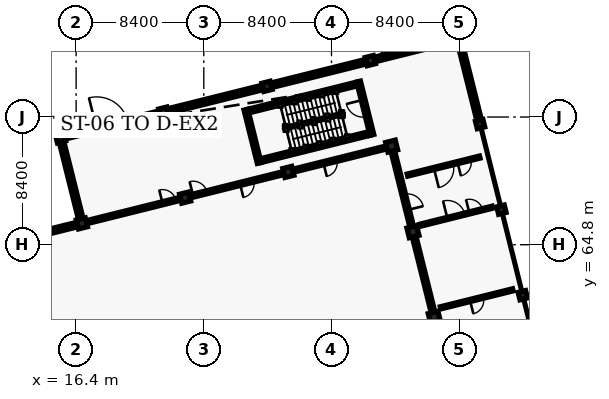
"""IFC4 building model, lengths in metres.
Left out: names, types, materials, properties, quantities, classifications, styles, units other than length and angle.
Written with IfcOpenShell. Run it as: python <this file> out.ifc"""

import sys

from ifc_helpers import new_model, si_unit, direction, frame, frame_2d, origin, origin_2d, place, context, subcontext, project, spatial, rectangle, extrude, element, fill, save


model = new_model("IFC4")
c1 = context("Model", 3, precision=1e-05, world=origin(), true_north=direction((0.0, 1.0)))
c2 = subcontext(c1, "Body", "Model", "MODEL_VIEW")
j1 = project(units=[si_unit("LENGTHUNIT", "METRE"), si_unit("PLANEANGLEUNIT", "RADIAN")], contexts=[c1])
p1 = place(None, origin())
s1 = spatial("IfcSite", under=j1, at=p1, CompositionType="ELEMENT")
p2 = place(p1, origin())
s2 = spatial("IfcBuilding", under=s1, at=p2, CompositionType="ELEMENT")
p3 = place(p2, origin())
s3 = spatial("IfcBuildingStorey", under=s2, at=p3, CompositionType="ELEMENT", Elevation=0.0)
for number, where, z_axis, x_axis in (
    (1, (39.962, 60.029, 0.0), (0.0, 0.0, 1.0), (0.97, 0.242, 0.0)),
    (2, (38.559, 65.657, 0.0), (0.0, 0.0, 1.0), (0.97, 0.242, 0.0)),
    (3, (37.156, 71.285, 0.0), (0.0, 0.0, 1.0), (0.97, 0.242, 0.0)),
):
    element("IfcColumn", number, at=place(p3, frame(where, z_axis=z_axis, x_axis=x_axis)), inside=s3, PredefinedType="COLUMN", context=c2, shape_type="SweptSolid", body=[
        extrude(rectangle(XDim=0.65, YDim=0.65, at=origin_2d()), origin(), (0.0, 0.0, 1.0), 4.8),
    ])
for number, where, z_axis, x_axis in (
    (4, (45.784, 61.481, 0.0), (0.0, 0.0, 1.0), (0.97, 0.242, 0.0)),
    (5, (44.381, 67.108, 0.0), (0.0, 0.0, 1.0), (0.97, 0.242, 0.0)),
    (6, (42.977, 72.736, 0.0), (0.0, 0.0, 1.0), (0.97, 0.242, 0.0)),
):
    element("IfcColumn", number, at=place(p3, frame(where, z_axis=z_axis, x_axis=x_axis)), inside=s3, PredefinedType="COLUMN", context=c2, shape_type="SweptSolid", body=[
        extrude(rectangle(XDim=0.5, YDim=0.5, at=origin_2d()), origin(), (0.0, 0.0, 1.0), 4.8),
    ])
for number, where, z_axis, x_axis in (
    (7, (16.779, 66.204, 0.0), (0.0, 0.0, 1.0), (0.97, 0.242, 0.0)),
    (8, (23.572, 67.898, 0.0), (0.0, 0.0, 1.0), (0.97, 0.242, 0.0)),
    (9, (30.364, 69.591, 0.0), (0.0, 0.0, 1.0), (0.97, 0.242, 0.0)),
):
    element("IfcColumn", number, at=place(p3, frame(where, z_axis=z_axis, x_axis=x_axis)), inside=s3, PredefinedType="COLUMN", context=c2, shape_type="SweptSolid", body=[
        extrude(rectangle(XDim=0.6, YDim=0.6, at=origin_2d()), origin(), (0.0, 0.0, 1.0), 4.8),
    ])
for number, where, z_axis, x_axis in (
    (10, (15.376, 71.832, 0.0), (0.0, 0.0, 1.0), (0.97, 0.242, 0.0)),
    (11, (22.168, 73.525, 0.0), (0.0, 0.0, 1.0), (0.97, 0.242, 0.0)),
    (12, (28.96, 75.219, 0.0), (0.0, 0.0, 1.0), (0.97, 0.242, 0.0)),
    (13, (35.753, 76.912, 0.0), (0.0, 0.0, 1.0), (0.97, 0.242, 0.0)),
):
    element("IfcColumn", number, at=place(p3, frame(where, z_axis=z_axis, x_axis=x_axis)), inside=s3, PredefinedType="COLUMN", context=c2, shape_type="SweptSolid", body=[
        extrude(rectangle(XDim=0.55, YDim=0.55, at=origin_2d()), origin(), (0.0, 0.0, 1.0), 4.8),
    ])
p4 = place(p3, frame((10.065, 64.53, 0.0), z_axis=(0.0, 0.0, 1.0), x_axis=(0.97027883487, 0.241989633258, 0.0)))
e14 = element("IfcWall", 14, at=p4, inside=s3, PredefinedType="SOLIDWALL", context=c2, shape_type="SweptSolid", body=[
    extrude(rectangle(XDim=6.839, YDim=0.3, at=frame_2d((3.42, 0.0))), origin(), (0.0, 0.0, 1.0), 4.085),
])
for number, where, z_axis, x_axis in (
    (15, (16.76, 66.282, 0.0), (0.0, 0.0, 1.0), (-0.242, 0.97, 0.0)),
    (16, (42.958, 72.814, 0.0), (0.0, 0.0, 1.0), (-0.242, 0.97, 0.0)),
):
    element("IfcWall", number, at=place(p3, frame(where, z_axis=z_axis, x_axis=x_axis)), inside=s3, PredefinedType="SOLIDWALL", context=c2, shape_type="SweptSolid", body=[
        extrude(rectangle(XDim=5.64, YDim=0.3, at=frame_2d((2.82, 0.0))), origin(), (0.0, 0.0, 1.0), 4.095),
    ])
p5 = place(p3, frame((15.473, 71.856, 0.0), z_axis=(0.0, 0.0, 1.0), x_axis=(0.970298579828, 0.24191045034, 0.0)))
e17 = element("IfcWall", 17, at=p5, inside=s3, PredefinedType="SOLIDWALL", context=c2, shape_type="SweptSolid", body=[
    extrude(rectangle(XDim=6.8, YDim=0.3, at=frame_2d((3.4, 0.0))), origin(), (0.0, 0.0, 1.0), 4.065),
])
p6 = place(p5, frame((2.35, 0.0, 0.0)))
e18 = element("IfcOpeningElement", 18, at=p6, cuts=e17, PredefinedType="OPENING", context=c2, shape_type="SweptSolid", body=[
    extrude(rectangle(XDim=2.1, YDim=2.35, at=frame_2d((1.05, 1.175))), frame((0.0, 0.16, 0.0), z_axis=(0.0, -1.0, 0.0), x_axis=(1.0, 0.0, 0.0)), (0.0, 0.0, 1.0), 0.32),
])
p7 = place(p3, frame((22.265, 73.55, 0.0), z_axis=(0.0, 0.0, 1.0), x_axis=(0.970298579828, 0.24191045034, 0.0)))
e19 = element("IfcWall", 19, at=p7, inside=s3, PredefinedType="SOLIDWALL", context=c2, shape_type="SweptSolid", body=[
    extrude(rectangle(XDim=6.8, YDim=0.3, at=frame_2d((3.4, 0.0))), origin(), (0.0, 0.0, 1.0), 4.065),
])
p8 = place(p3, frame((29.058, 75.243, 0.0), z_axis=(0.0, 0.0, 1.0), x_axis=(0.970296478685, 0.241918877831, 0.0)))
e20 = element("IfcWall", 20, at=p8, inside=s3, PredefinedType="SOLIDWALL", context=c2, shape_type="SweptSolid", body=[
    extrude(rectangle(XDim=6.8, YDim=0.3, at=frame_2d((3.4, 0.0))), origin(), (0.0, 0.0, 1.0), 4.065),
])
p9 = place(p3, frame((35.85, 76.937, 0.0), z_axis=(0.0, 0.0, 1.0), x_axis=(0.97029090175, 0.241941244896, 0.0)))
e21 = element("IfcWall", 21, at=p9, inside=s3, PredefinedType="SOLIDWALL", context=c2, shape_type="SweptSolid", body=[
    extrude(rectangle(XDim=5.799, YDim=0.3, at=frame_2d((2.9, 0.0))), origin(), (0.0, 0.0, 1.0), 4.065),
])
p10 = place(p9, frame((0.775, 0.0, 0.0)))
e22 = element("IfcOpeningElement", 22, at=p10, cuts=e21, PredefinedType="OPENING", context=c2, shape_type="SweptSolid", body=[
    extrude(rectangle(XDim=2.05, YDim=2.32, at=frame_2d((1.025, 1.16))), frame((0.0, 0.16, 0.0), z_axis=(0.0, -1.0, 0.0), x_axis=(1.0, 0.0, 0.0)), (0.0, 0.0, 1.0), 0.32),
])
p11 = place(p3, frame((34.984, 75.531, 0.0), z_axis=(0.0, 0.0, 1.0), x_axis=(0.242090083699, -0.97025377679, 0.0)))
e23 = element("IfcWall", 23, at=p11, inside=s3, PredefinedType="SHEAR", context=c2, shape_type="SweptSolid", body=[
    extrude(rectangle(XDim=3.61, YDim=0.25, at=frame_2d((1.805, 0.0))), origin(), (0.0, 0.0, 1.0), 4.56),
])
p12 = place(p11, frame((1.235, 0.0, 0.0)))
e24 = element("IfcOpeningElement", 24, at=p12, cuts=e23, PredefinedType="OPENING", context=c2, shape_type="SweptSolid", body=[
    extrude(rectangle(XDim=1.14, YDim=2.15, at=frame_2d((0.57, 1.075))), frame((0.0, 0.135, 0.0), z_axis=(0.0, -1.0, 0.0), x_axis=(1.0, 0.0, 0.0)), (0.0, 0.0, 1.0), 0.27),
])
p13 = place(p3, frame((28.444, 70.18, 0.0), z_axis=(0.0, 0.0, 1.0), x_axis=(-0.241898912952, 0.970301456204, 0.0)))
e25 = element("IfcWall", 25, at=p13, inside=s3, PredefinedType="SHEAR", context=c2, shape_type="SweptSolid", body=[
    extrude(rectangle(XDim=3.609, YDim=0.25, at=frame_2d((1.805, 0.0))), origin(), (0.0, 0.0, 1.0), 4.56),
])
p14 = place(p3, frame((35.706, 72.119, 0.0), z_axis=(0.0, 0.0, 1.0), x_axis=(-0.970299691856, -0.241905989972, 0.0)))
e26 = element("IfcWall", 26, at=p14, inside=s3, PredefinedType="SHEAR", context=c2, shape_type="SweptSolid", body=[
    extrude(rectangle(XDim=7.391, YDim=0.25, at=frame_2d((3.695, 0.0))), origin(), (0.0, 0.0, 1.0), 4.56),
])
p15 = place(p3, frame((27.723, 73.591, 0.0), z_axis=(0.0, 0.0, 1.0), x_axis=(0.970291958031, 0.241937008705, 0.0)))
e27 = element("IfcWall", 27, at=p15, inside=s3, PredefinedType="SHEAR", context=c2, shape_type="SweptSolid", body=[
    extrude(rectangle(XDim=7.39, YDim=0.25, at=frame_2d((3.695, 0.0))), origin(), (0.0, 0.0, 1.0), 4.56),
])
p16 = place(p3, frame((41.28, 54.742, 0.0), z_axis=(0.0, 0.0, 1.0), x_axis=(-0.241866165603, 0.970309619625, 0.0)))
e28 = element("IfcWall", 28, at=p16, inside=s3, PredefinedType="PARTITIONING", context=c2, shape_type="SweptSolid", body=[
    extrude(rectangle(XDim=10.898, YDim=0.24, at=frame_2d((5.449, 0.0))), origin(), (0.0, 0.0, 1.0), 4.006),
])
p17 = place(p16, frame((3.539, 0.0, 0.0)))
e29 = element("IfcOpeningElement", 29, at=p17, cuts=e28, PredefinedType="OPENING", context=c2, shape_type="SweptSolid", body=[
    extrude(rectangle(XDim=1.12, YDim=2.16, at=frame_2d((0.56, 1.08))), frame((0.0, 0.13, 0.0), z_axis=(0.0, -1.0, 0.0), x_axis=(1.0, 0.0, 0.0)), (0.0, 0.0, 1.0), 0.26),
])
p18 = place(p3, frame((38.474, 65.997, 0.0), z_axis=(0.0, 0.0, 1.0), x_axis=(-0.241825856576, 0.970319666446, 0.0)))
e30 = element("IfcWall", 30, at=p18, inside=s3, PredefinedType="PARTITIONING", context=c2, shape_type="SweptSolid", body=[
    extrude(rectangle(XDim=5.099, YDim=0.24, at=frame_2d((2.55, 0.0))), origin(), (0.0, 0.0, 1.0), 3.845),
])
p19 = place(p18, frame((1.12, 0.0, 0.0)))
e31 = element("IfcOpeningElement", 31, at=p19, cuts=e30, PredefinedType="OPENING", context=c2, shape_type="SweptSolid", body=[
    extrude(rectangle(XDim=1.06, YDim=2.16, at=frame_2d((0.53, 1.08))), frame((0.0, 0.13, 0.0), z_axis=(0.0, -1.0, 0.0), x_axis=(1.0, 0.0, 0.0)), (0.0, 0.0, 1.0), 0.26),
])
p20 = place(p3, frame((17.119, 66.289, 0.0), z_axis=(0.0, 0.0, 1.0), x_axis=(0.970297233618, 0.241915849902, 0.0)))
e32 = element("IfcWall", 32, at=p20, inside=s3, PredefinedType="PARTITIONING", context=c2, shape_type="SweptSolid", body=[
    extrude(rectangle(XDim=20.3, YDim=0.2, at=frame_2d((10.15, 0.0))), origin(), (0.0, 0.0, 1.0), 3.845),
])
p21 = place(p20, frame((7.192, 0.0, 0.0)))
e33 = element("IfcOpeningElement", 33, at=p21, cuts=e32, PredefinedType="OPENING", context=c2, shape_type="SweptSolid", body=[
    extrude(rectangle(XDim=0.95, YDim=2.12, at=frame_2d((0.475, 1.06))), frame((0.0, 0.11, 0.0), z_axis=(0.0, -1.0, 0.0), x_axis=(1.0, 0.0, 0.0)), (0.0, 0.0, 1.0), 0.22),
])
p22 = place(p20, frame((10.373, 0.0, 0.0)))
e34 = element("IfcOpeningElement", 34, at=p22, cuts=e32, PredefinedType="OPENING", context=c2, shape_type="SweptSolid", body=[
    extrude(rectangle(XDim=0.92, YDim=2.1, at=frame_2d((0.46, 1.05))), frame((0.0, 0.11, 0.0), z_axis=(0.0, -1.0, 0.0), x_axis=(1.0, 0.0, 0.0)), (0.0, 0.0, 1.0), 0.22),
])
p23 = place(p20, frame((5.12, 0.0, 0.0)))
e35 = element("IfcOpeningElement", 35, at=p23, cuts=e32, PredefinedType="OPENING", context=c2, shape_type="SweptSolid", body=[
    extrude(rectangle(XDim=0.9, YDim=2.06, at=frame_2d((0.45, 1.03))), frame((0.0, 0.11, 0.0), z_axis=(0.0, -1.0, 0.0), x_axis=(1.0, 0.0, 0.0)), (0.0, 0.0, 1.0), 0.22),
])
p24 = place(p20, frame((16.03, 0.0, 0.0)))
e36 = element("IfcOpeningElement", 36, at=p24, cuts=e32, PredefinedType="OPENING", context=c2, shape_type="SweptSolid", body=[
    extrude(rectangle(XDim=0.9, YDim=2.06, at=frame_2d((0.45, 1.03))), frame((0.0, 0.11, 0.0), z_axis=(0.0, -1.0, 0.0), x_axis=(1.0, 0.0, 0.0)), (0.0, 0.0, 1.0), 0.22),
])
p25 = place(p3, frame((40.375, 60.648, 0.0), z_axis=(0.0, 0.0, 1.0), x_axis=(0.970306426655, 0.241878974681, 0.0)))
e37 = element("IfcWall", 37, at=p25, inside=s3, PredefinedType="PARTITIONING", context=c2, shape_type="SweptSolid", body=[
    extrude(rectangle(XDim=4.899, YDim=0.14, at=frame_2d((2.45, 0.0))), origin(), (0.0, 0.0, 1.0), 4.187),
])
p26 = place(p25, frame((2.0, 0.0, 0.0)))
e38 = element("IfcOpeningElement", 38, at=p26, cuts=e37, PredefinedType="OPENING", context=c2, shape_type="SweptSolid", body=[
    extrude(rectangle(XDim=0.9, YDim=2.06, at=frame_2d((0.45, 1.03))), frame((0.0, 0.08, 0.0), z_axis=(0.0, -1.0, 0.0), x_axis=(1.0, 0.0, 0.0)), (0.0, 0.0, 1.0), 0.16),
])
p27 = place(p3, frame((39.02, 66.081, 0.0), z_axis=(0.0, 0.0, 1.0), x_axis=(0.970306426655, 0.241878974681, 0.0)))
e39 = element("IfcWall", 39, at=p27, inside=s3, PredefinedType="PARTITIONING", context=c2, shape_type="SweptSolid", body=[
    extrude(rectangle(XDim=4.899, YDim=0.14, at=frame_2d((2.45, 0.0))), origin(), (0.0, 0.0, 1.0), 4.187),
])
p28 = place(p27, frame((1.86, 0.0, 0.0)))
e40 = element("IfcOpeningElement", 40, at=p28, cuts=e39, PredefinedType="OPENING", context=c2, shape_type="SweptSolid", body=[
    extrude(rectangle(XDim=1.18, YDim=2.18, at=frame_2d((0.59, 1.09))), frame((0.0, 0.08, 0.0), z_axis=(0.0, -1.0, 0.0), x_axis=(1.0, 0.0, 0.0)), (0.0, 0.0, 1.0), 0.16),
])
p29 = place(p27, frame((3.35, 0.0, 0.0)))
e41 = element("IfcOpeningElement", 41, at=p29, cuts=e39, PredefinedType="OPENING", context=c2, shape_type="SweptSolid", body=[
    extrude(rectangle(XDim=0.9, YDim=2.06, at=frame_2d((0.45, 1.03))), frame((0.0, 0.08, 0.0), z_axis=(0.0, -1.0, 0.0), x_axis=(1.0, 0.0, 0.0)), (0.0, 0.0, 1.0), 0.16),
])
p30 = place(p3, frame((38.198, 69.38, 0.0), z_axis=(0.0, 0.0, 1.0), x_axis=(0.970294761766, 0.241925764003, 0.0)))
e42 = element("IfcWall", 42, at=p30, inside=s3, PredefinedType="PARTITIONING", context=c2, shape_type="SweptSolid", body=[
    extrude(rectangle(XDim=4.898, YDim=0.14, at=frame_2d((2.449, 0.0))), origin(), (0.0, 0.0, 1.0), 4.187),
])
p31 = place(p30, frame((1.799, 0.0, 0.0)))
e43 = element("IfcOpeningElement", 43, at=p31, cuts=e42, PredefinedType="OPENING", context=c2, shape_type="SweptSolid", body=[
    extrude(rectangle(XDim=1.3, YDim=2.2, at=frame_2d((0.65, 1.1))), frame((0.0, 0.08, 0.0), z_axis=(0.0, -1.0, 0.0), x_axis=(1.0, 0.0, 0.0)), (0.0, 0.0, 1.0), 0.16),
])
p32 = place(p30, frame((3.399, 0.0, 0.0)))
e44 = element("IfcOpeningElement", 44, at=p32, cuts=e42, PredefinedType="OPENING", context=c2, shape_type="SweptSolid", body=[
    extrude(rectangle(XDim=0.9, YDim=2.06, at=frame_2d((0.45, 1.03))), frame((0.0, 0.08, 0.0), z_axis=(0.0, -1.0, 0.0), x_axis=(1.0, 0.0, 0.0)), (0.0, 0.0, 1.0), 0.16),
])
p33 = place(p12, origin())
e45 = element("IfcDoor", 45, at=p33, inside=s3, OperationType="SINGLE_SWING_RIGHT", PredefinedType="DOOR", context=c2, shape_type="SweptSolid", body=[
    extrude(rectangle(XDim=1.14, YDim=2.15, at=frame_2d((0.57, 1.075))), frame((0.0, 0.025, 0.0), z_axis=(0.0, -1.0, 0.0), x_axis=(1.0, 0.0, 0.0)), (0.0, 0.0, 1.0), 0.05),
])
fill(e24, e45)
p34 = place(p6, origin())
e46 = element("IfcDoor", 46, at=p34, inside=s3, OperationType="DOUBLE_DOOR_SINGLE_SWING", PredefinedType="DOOR", context=c2, shape_type="SweptSolid", body=[
    extrude(rectangle(XDim=2.1, YDim=2.35, at=frame_2d((1.05, 1.175))), frame((0.0, 0.025, 0.0), z_axis=(0.0, -1.0, 0.0), x_axis=(1.0, 0.0, 0.0)), (0.0, 0.0, 1.0), 0.05),
])
fill(e18, e46)
p35 = place(p10, origin())
e47 = element("IfcDoor", 47, at=p35, inside=s3, OperationType="DOUBLE_DOOR_SINGLE_SWING", PredefinedType="GATE", context=c2, shape_type="SweptSolid", body=[
    extrude(rectangle(XDim=2.05, YDim=2.32, at=frame_2d((1.025, 1.16))), frame((0.0, 0.025, 0.0), z_axis=(0.0, -1.0, 0.0), x_axis=(1.0, 0.0, 0.0)), (0.0, 0.0, 1.0), 0.05),
])
fill(e22, e47)
p36 = place(p19, origin())
e48 = element("IfcDoor", 48, at=p36, inside=s3, OperationType="SINGLE_SWING_RIGHT", PredefinedType="DOOR", context=c2, shape_type="SweptSolid", body=[
    extrude(rectangle(XDim=1.06, YDim=2.16, at=frame_2d((0.53, 1.08))), frame((0.0, 0.025, 0.0), z_axis=(0.0, -1.0, 0.0), x_axis=(1.0, 0.0, 0.0)), (0.0, 0.0, 1.0), 0.05),
])
fill(e31, e48)
p37 = place(p21, origin())
e49 = element("IfcDoor", 49, at=p37, inside=s3, OperationType="SINGLE_SWING_LEFT", PredefinedType="DOOR", context=c2, shape_type="SweptSolid", body=[
    extrude(rectangle(XDim=0.95, YDim=2.12, at=frame_2d((0.475, 1.06))), frame((0.0, 0.025, 0.0), z_axis=(0.0, -1.0, 0.0), x_axis=(1.0, 0.0, 0.0)), (0.0, 0.0, 1.0), 0.05),
])
fill(e33, e49)
p38 = place(p22, origin())
e50 = element("IfcDoor", 50, at=p38, inside=s3, OperationType="SINGLE_SWING_RIGHT", PredefinedType="DOOR", context=c2, shape_type="SweptSolid", body=[
    extrude(rectangle(XDim=0.92, YDim=2.1, at=frame_2d((0.46, 1.05))), frame((0.0, 0.025, 0.0), z_axis=(0.0, -1.0, 0.0), x_axis=(1.0, 0.0, 0.0)), (0.0, 0.0, 1.0), 0.05),
])
fill(e34, e50)
p39 = place(p26, origin())
e51 = element("IfcDoor", 51, at=p39, inside=s3, OperationType="SINGLE_SWING_RIGHT", PredefinedType="DOOR", context=c2, shape_type="SweptSolid", body=[
    extrude(rectangle(XDim=0.9, YDim=2.06, at=frame_2d((0.45, 1.03))), frame((0.0, 0.025, 0.0), z_axis=(0.0, -1.0, 0.0), x_axis=(1.0, 0.0, 0.0)), (0.0, 0.0, 1.0), 0.05),
])
fill(e38, e51)
p40 = place(p28, origin())
e52 = element("IfcDoor", 52, at=p40, inside=s3, OperationType="SINGLE_SWING_LEFT", PredefinedType="DOOR", context=c2, shape_type="SweptSolid", body=[
    extrude(rectangle(XDim=1.18, YDim=2.18, at=frame_2d((0.59, 1.09))), frame((0.0, 0.025, 0.0), z_axis=(0.0, -1.0, 0.0), x_axis=(1.0, 0.0, 0.0)), (0.0, 0.0, 1.0), 0.05),
])
fill(e40, e52)
p41 = place(p31, origin())
e53 = element("IfcDoor", 53, at=p41, inside=s3, OperationType="SINGLE_SWING_RIGHT", PredefinedType="DOOR", context=c2, shape_type="SweptSolid", body=[
    extrude(rectangle(XDim=1.3, YDim=2.2, at=frame_2d((0.65, 1.1))), frame((0.0, 0.025, 0.0), z_axis=(0.0, -1.0, 0.0), x_axis=(1.0, 0.0, 0.0)), (0.0, 0.0, 1.0), 0.05),
])
fill(e43, e53)
p42 = place(p29, origin())
e54 = element("IfcDoor", 54, at=p42, inside=s3, OperationType="SINGLE_SWING_LEFT", PredefinedType="DOOR", context=c2, shape_type="SweptSolid", body=[
    extrude(rectangle(XDim=0.9, YDim=2.06, at=frame_2d((0.45, 1.03))), frame((0.0, 0.025, 0.0), z_axis=(0.0, -1.0, 0.0), x_axis=(1.0, 0.0, 0.0)), (0.0, 0.0, 1.0), 0.05),
])
fill(e41, e54)
p43 = place(p32, origin())
e55 = element("IfcDoor", 55, at=p43, inside=s3, OperationType="SINGLE_SWING_RIGHT", PredefinedType="DOOR", context=c2, shape_type="SweptSolid", body=[
    extrude(rectangle(XDim=0.9, YDim=2.06, at=frame_2d((0.45, 1.03))), frame((0.0, 0.025, 0.0), z_axis=(0.0, -1.0, 0.0), x_axis=(1.0, 0.0, 0.0)), (0.0, 0.0, 1.0), 0.05),
])
fill(e44, e55)
p44 = place(p23, origin())
e56 = element("IfcDoor", 56, at=p44, inside=s3, OperationType="SINGLE_SWING_LEFT", PredefinedType="DOOR", context=c2, shape_type="SweptSolid", body=[
    extrude(rectangle(XDim=0.9, YDim=2.06, at=frame_2d((0.45, 1.03))), frame((0.0, 0.025, 0.0), z_axis=(0.0, -1.0, 0.0), x_axis=(1.0, 0.0, 0.0)), (0.0, 0.0, 1.0), 0.05),
])
fill(e35, e56)
p45 = place(p24, origin())
e57 = element("IfcDoor", 57, at=p45, inside=s3, OperationType="SINGLE_SWING_RIGHT", PredefinedType="DOOR", context=c2, shape_type="SweptSolid", body=[
    extrude(rectangle(XDim=0.9, YDim=2.06, at=frame_2d((0.45, 1.03))), frame((0.0, 0.025, 0.0), z_axis=(0.0, -1.0, 0.0), x_axis=(1.0, 0.0, 0.0)), (0.0, 0.0, 1.0), 0.05),
])
fill(e36, e57)
save(model, sys.argv[1])
